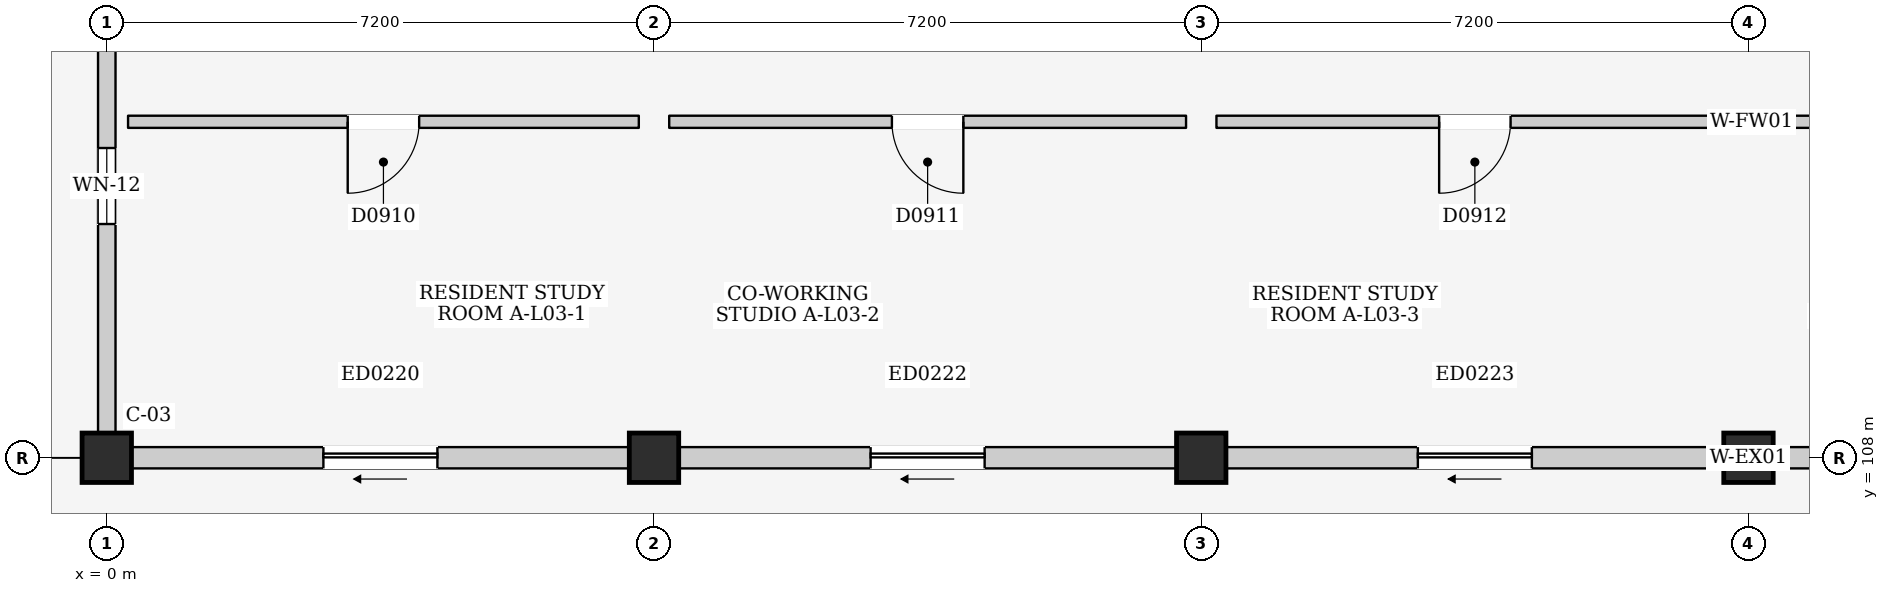
"""IFC4 building model, lengths in metres.
Left out: names, types, materials, properties, quantities, classifications, styles, units other than length and angle.
Written with IfcOpenShell. Run it as: python <this file> out.ifc"""

import sys

from ifc_helpers import new_model, si_unit, direction, frame, frame_2d, origin, origin_2d, place, context, subcontext, project, spatial, rectangle, extrude, element, fill, save


model = new_model("IFC4")
c1 = context("Model", 3, precision=1e-05, world=origin(), true_north=direction((0.0, 1.0)))
c2 = subcontext(c1, "Body", "Model", "MODEL_VIEW")
j1 = project(units=[si_unit("LENGTHUNIT", "METRE"), si_unit("PLANEANGLEUNIT", "RADIAN")], contexts=[c1])
p1 = place(None, origin())
s1 = spatial("IfcSite", under=j1, at=p1, CompositionType="ELEMENT")
p2 = place(p1, origin())
s2 = spatial("IfcBuilding", under=s1, at=p2, CompositionType="ELEMENT")
p3 = place(p2, frame((0.0, 0.0, 12.2)))
s3 = spatial("IfcBuildingStorey", under=s2, at=p3, CompositionType="ELEMENT", Elevation=12.2)
for number, where, z_axis, x_axis in (
    (1, (0.0, 108.0, 0.0), (0.0, 0.0, 1.0), (1.0, 0.0, 0.0)),
    (2, (7.2, 108.0, 0.0), (0.0, 0.0, 1.0), (1.0, 0.0, 0.0)),
    (3, (14.4, 108.0, 0.0), (0.0, 0.0, 1.0), (1.0, 0.0, 0.0)),
    (4, (21.6, 108.0, 0.0), (0.0, 0.0, 1.0), (1.0, 0.0, 0.0)),
):
    element("IfcColumn", number, at=place(p3, frame(where, z_axis=z_axis, x_axis=x_axis)), inside=s3, PredefinedType="COLUMN", context=c2, shape_type="SweptSolid", body=[
        extrude(rectangle(XDim=0.65, YDim=0.65, at=origin_2d()), origin(), (0.0, 0.0, 1.0), 3.2),
    ])
p4 = place(p3, frame((0.325, 108.0, 0.0), z_axis=(0.0, 0.0, 1.0), x_axis=(1.0, 0.0, 0.0)))
e5 = element("IfcWall", 5, at=p4, inside=s3, PredefinedType="ELEMENTEDWALL", context=c2, shape_type="SweptSolid", body=[
    extrude(rectangle(XDim=6.55, YDim=0.28, at=frame_2d((3.275, 0.0))), origin(), (0.0, 0.0, 1.0), 2.315),
])
p5 = place(p4, frame((2.525, 0.0, 0.0)))
e6 = element("IfcOpeningElement", 6, at=p5, cuts=e5, PredefinedType="OPENING", context=c2, shape_type="SweptSolid", body=[
    extrude(rectangle(XDim=1.5, YDim=2.12, at=frame_2d((0.75, 1.06))), frame((0.0, 0.155, 0.0), z_axis=(0.0, -1.0, 0.0), x_axis=(1.0, 0.0, 0.0)), (0.0, 0.0, 1.0), 0.31),
])
p6 = place(p3, frame((7.525, 108.0, 0.0), z_axis=(0.0, 0.0, 1.0), x_axis=(1.0, 0.0, 0.0)))
e7 = element("IfcWall", 7, at=p6, inside=s3, PredefinedType="ELEMENTEDWALL", context=c2, shape_type="SweptSolid", body=[
    extrude(rectangle(XDim=6.55, YDim=0.28, at=frame_2d((3.275, 0.0))), origin(), (0.0, 0.0, 1.0), 2.315),
])
p7 = place(p6, frame((2.525, 0.0, 0.0)))
e8 = element("IfcOpeningElement", 8, at=p7, cuts=e7, PredefinedType="OPENING", context=c2, shape_type="SweptSolid", body=[
    extrude(rectangle(XDim=1.5, YDim=2.12, at=frame_2d((0.75, 1.06))), frame((0.0, 0.155, 0.0), z_axis=(0.0, -1.0, 0.0), x_axis=(1.0, 0.0, 0.0)), (0.0, 0.0, 1.0), 0.31),
])
p8 = place(p3, frame((14.725, 108.0, 0.0), z_axis=(0.0, 0.0, 1.0), x_axis=(1.0, 0.0, 0.0)))
e9 = element("IfcWall", 9, at=p8, inside=s3, PredefinedType="ELEMENTEDWALL", context=c2, shape_type="SweptSolid", body=[
    extrude(rectangle(XDim=6.55, YDim=0.28, at=frame_2d((3.275, 0.0))), origin(), (0.0, 0.0, 1.0), 2.315),
])
p9 = place(p8, frame((2.525, 0.0, 0.0)))
e10 = element("IfcOpeningElement", 10, at=p9, cuts=e9, PredefinedType="OPENING", context=c2, shape_type="SweptSolid", body=[
    extrude(rectangle(XDim=1.5, YDim=2.12, at=frame_2d((0.75, 1.06))), frame((0.0, 0.155, 0.0), z_axis=(0.0, -1.0, 0.0), x_axis=(1.0, 0.0, 0.0)), (0.0, 0.0, 1.0), 0.31),
])
p10 = place(p3, frame((21.925, 108.0, 0.0), z_axis=(0.0, 0.0, 1.0), x_axis=(1.0, 0.0, 0.0)))
e11 = element("IfcWall", 11, at=p10, inside=s3, PredefinedType="ELEMENTEDWALL", context=c2, shape_type="SweptSolid", body=[
    extrude(rectangle(XDim=6.55, YDim=0.28, at=frame_2d((3.275, 0.0))), origin(), (0.0, 0.0, 1.0), 2.315),
])
p11 = place(p10, frame((2.525, 0.0, 0.0)))
e12 = element("IfcOpeningElement", 12, at=p11, cuts=e11, PredefinedType="OPENING", context=c2, shape_type="SweptSolid", body=[
    extrude(rectangle(XDim=1.5, YDim=2.12, at=frame_2d((0.75, 1.06))), frame((0.0, 0.155, 0.0), z_axis=(0.0, -1.0, 0.0), x_axis=(1.0, 0.0, 0.0)), (0.0, 0.0, 1.0), 0.31),
])
p12 = place(p3, frame((0.0, 108.325, 0.0), z_axis=(0.0, 0.0, 1.0), x_axis=(0.0, 1.0, 0.0)))
e13 = element("IfcWall", 13, at=p12, inside=s3, PredefinedType="ELEMENTEDWALL", context=c2, shape_type="SweptSolid", body=[
    extrude(rectangle(XDim=6.55, YDim=0.23, at=frame_2d((3.275, 0.0))), origin(), (0.0, 0.0, 1.0), 2.445),
])
p13 = place(p12, frame((2.75, 0.0, 1.1)))
e14 = element("IfcOpeningElement", 14, at=p13, cuts=e13, PredefinedType="OPENING", context=c2, shape_type="SweptSolid", body=[
    extrude(rectangle(XDim=1.0, YDim=0.9, at=frame_2d((0.5, 0.45))), frame((0.0, 0.13, 0.0), z_axis=(0.0, -1.0, 0.0), x_axis=(1.0, 0.0, 0.0)), (0.0, 0.0, 1.0), 0.26),
])
p14 = place(p3, frame((0.28, 112.42, 0.0), z_axis=(0.0, 0.0, 1.0), x_axis=(1.0, 0.0, 0.0)))
e15 = element("IfcWall", 15, at=p14, inside=s3, PredefinedType="PARTITIONING", context=c2, shape_type="SweptSolid", body=[
    extrude(rectangle(XDim=6.72, YDim=0.16, at=frame_2d((3.36, 0.0))), origin(), (0.0, 0.0, 1.0), 2.98),
])
p15 = place(p14, frame((2.89, 0.0, 0.0)))
e16 = element("IfcOpeningElement", 16, at=p15, cuts=e15, PredefinedType="OPENING", context=c2, shape_type="SweptSolid", body=[
    extrude(rectangle(XDim=0.94, YDim=2.12, at=frame_2d((0.47, 1.06))), frame((0.0, 0.095, 0.0), z_axis=(0.0, -1.0, 0.0), x_axis=(1.0, 0.0, 0.0)), (0.0, 0.0, 1.0), 0.19),
])
p16 = place(p3, frame((7.4, 112.42, 0.0), z_axis=(0.0, 0.0, 1.0), x_axis=(1.0, 0.0, 0.0)))
e17 = element("IfcWall", 17, at=p16, inside=s3, PredefinedType="PARTITIONING", context=c2, shape_type="SweptSolid", body=[
    extrude(rectangle(XDim=6.8, YDim=0.16, at=frame_2d((3.4, 0.0))), origin(), (0.0, 0.0, 1.0), 2.98),
])
p17 = place(p16, frame((2.93, 0.0, 0.0)))
e18 = element("IfcOpeningElement", 18, at=p17, cuts=e17, PredefinedType="OPENING", context=c2, shape_type="SweptSolid", body=[
    extrude(rectangle(XDim=0.94, YDim=2.12, at=frame_2d((0.47, 1.06))), frame((0.0, 0.095, 0.0), z_axis=(0.0, -1.0, 0.0), x_axis=(1.0, 0.0, 0.0)), (0.0, 0.0, 1.0), 0.19),
])
p18 = place(p3, frame((14.6, 112.42, 0.0), z_axis=(0.0, 0.0, 1.0), x_axis=(1.0, 0.0, 0.0)))
e19 = element("IfcWall", 19, at=p18, inside=s3, PredefinedType="PARTITIONING", context=c2, shape_type="SweptSolid", body=[
    extrude(rectangle(XDim=6.8, YDim=0.16, at=frame_2d((3.4, 0.0))), origin(), (0.0, 0.0, 1.0), 2.98),
])
p19 = place(p18, frame((2.93, 0.0, 0.0)))
e20 = element("IfcOpeningElement", 20, at=p19, cuts=e19, PredefinedType="OPENING", context=c2, shape_type="SweptSolid", body=[
    extrude(rectangle(XDim=0.94, YDim=2.12, at=frame_2d((0.47, 1.06))), frame((0.0, 0.095, 0.0), z_axis=(0.0, -1.0, 0.0), x_axis=(1.0, 0.0, 0.0)), (0.0, 0.0, 1.0), 0.19),
])
p20 = place(p3, frame((21.8, 112.42, 0.0), z_axis=(0.0, 0.0, 1.0), x_axis=(1.0, 0.0, 0.0)))
e21 = element("IfcWall", 21, at=p20, inside=s3, PredefinedType="PARTITIONING", context=c2, shape_type="SweptSolid", body=[
    extrude(rectangle(XDim=6.8, YDim=0.16, at=frame_2d((3.4, 0.0))), origin(), (0.0, 0.0, 1.0), 2.98),
])
p21 = place(p20, frame((2.93, 0.0, 0.0)))
e22 = element("IfcOpeningElement", 22, at=p21, cuts=e21, PredefinedType="OPENING", context=c2, shape_type="SweptSolid", body=[
    extrude(rectangle(XDim=0.94, YDim=2.12, at=frame_2d((0.47, 1.06))), frame((0.0, 0.095, 0.0), z_axis=(0.0, -1.0, 0.0), x_axis=(1.0, 0.0, 0.0)), (0.0, 0.0, 1.0), 0.19),
])
p22 = place(p5, frame((1.5, 0.0, 0.0), z_axis=(0.0, 0.0, 1.0), x_axis=(-1.0, 0.0, 0.0)))
e23 = element("IfcDoor", 23, at=p22, inside=s3, OperationType="SLIDING_TO_LEFT", PredefinedType="DOOR", context=c2, shape_type="SweptSolid", body=[
    extrude(rectangle(XDim=1.5, YDim=2.12, at=frame_2d((0.75, 1.06))), frame((0.0, 0.025, 0.0), z_axis=(0.0, -1.0, 0.0), x_axis=(1.0, 0.0, 0.0)), (0.0, 0.0, 1.0), 0.05),
])
fill(e6, e23)
p23 = place(p7, frame((1.5, 0.0, 0.0), z_axis=(0.0, 0.0, 1.0), x_axis=(-1.0, 0.0, 0.0)))
e24 = element("IfcDoor", 24, at=p23, inside=s3, OperationType="SLIDING_TO_LEFT", PredefinedType="DOOR", context=c2, shape_type="SweptSolid", body=[
    extrude(rectangle(XDim=1.5, YDim=2.12, at=frame_2d((0.75, 1.06))), frame((0.0, 0.025, 0.0), z_axis=(0.0, -1.0, 0.0), x_axis=(1.0, 0.0, 0.0)), (0.0, 0.0, 1.0), 0.05),
])
fill(e8, e24)
p24 = place(p9, frame((1.5, 0.0, 0.0), z_axis=(0.0, 0.0, 1.0), x_axis=(-1.0, 0.0, 0.0)))
e25 = element("IfcDoor", 25, at=p24, inside=s3, OperationType="SLIDING_TO_LEFT", PredefinedType="DOOR", context=c2, shape_type="SweptSolid", body=[
    extrude(rectangle(XDim=1.5, YDim=2.12, at=frame_2d((0.75, 1.06))), frame((0.0, 0.025, 0.0), z_axis=(0.0, -1.0, 0.0), x_axis=(1.0, 0.0, 0.0)), (0.0, 0.0, 1.0), 0.05),
])
fill(e10, e25)
p25 = place(p13, origin())
e26 = element("IfcWindow", 26, at=p25, inside=s3, PartitioningType="SINGLE_PANEL", PredefinedType="WINDOW", context=c2, shape_type="SweptSolid", body=[
    extrude(rectangle(XDim=1.0, YDim=0.9, at=frame_2d((0.5, 0.45))), frame((0.0, 0.03, 0.0), z_axis=(0.0, -1.0, 0.0), x_axis=(1.0, 0.0, 0.0)), (0.0, 0.0, 1.0), 0.06),
])
fill(e14, e26)
p26 = place(p15, frame((0.94, 0.0, 0.0), z_axis=(0.0, 0.0, 1.0), x_axis=(-1.0, 0.0, 0.0)))
e27 = element("IfcDoor", 27, at=p26, inside=s3, OperationType="SINGLE_SWING_RIGHT", PredefinedType="DOOR", context=c2, shape_type="SweptSolid", body=[
    extrude(rectangle(XDim=0.94, YDim=2.12, at=frame_2d((0.47, 1.06))), frame((0.0, 0.025, 0.0), z_axis=(0.0, -1.0, 0.0), x_axis=(1.0, 0.0, 0.0)), (0.0, 0.0, 1.0), 0.05),
])
fill(e16, e27)
p27 = place(p17, frame((0.94, 0.0, 0.0), z_axis=(0.0, 0.0, 1.0), x_axis=(-1.0, 0.0, 0.0)))
e28 = element("IfcDoor", 28, at=p27, inside=s3, OperationType="SINGLE_SWING_LEFT", PredefinedType="DOOR", context=c2, shape_type="SweptSolid", body=[
    extrude(rectangle(XDim=0.94, YDim=2.12, at=frame_2d((0.47, 1.06))), frame((0.0, 0.025, 0.0), z_axis=(0.0, -1.0, 0.0), x_axis=(1.0, 0.0, 0.0)), (0.0, 0.0, 1.0), 0.05),
])
fill(e18, e28)
p28 = place(p19, frame((0.94, 0.0, 0.0), z_axis=(0.0, 0.0, 1.0), x_axis=(-1.0, 0.0, 0.0)))
e29 = element("IfcDoor", 29, at=p28, inside=s3, OperationType="SINGLE_SWING_RIGHT", PredefinedType="DOOR", context=c2, shape_type="SweptSolid", body=[
    extrude(rectangle(XDim=0.94, YDim=2.12, at=frame_2d((0.47, 1.06))), frame((0.0, 0.025, 0.0), z_axis=(0.0, -1.0, 0.0), x_axis=(1.0, 0.0, 0.0)), (0.0, 0.0, 1.0), 0.05),
])
fill(e20, e29)
save(model, sys.argv[1])
